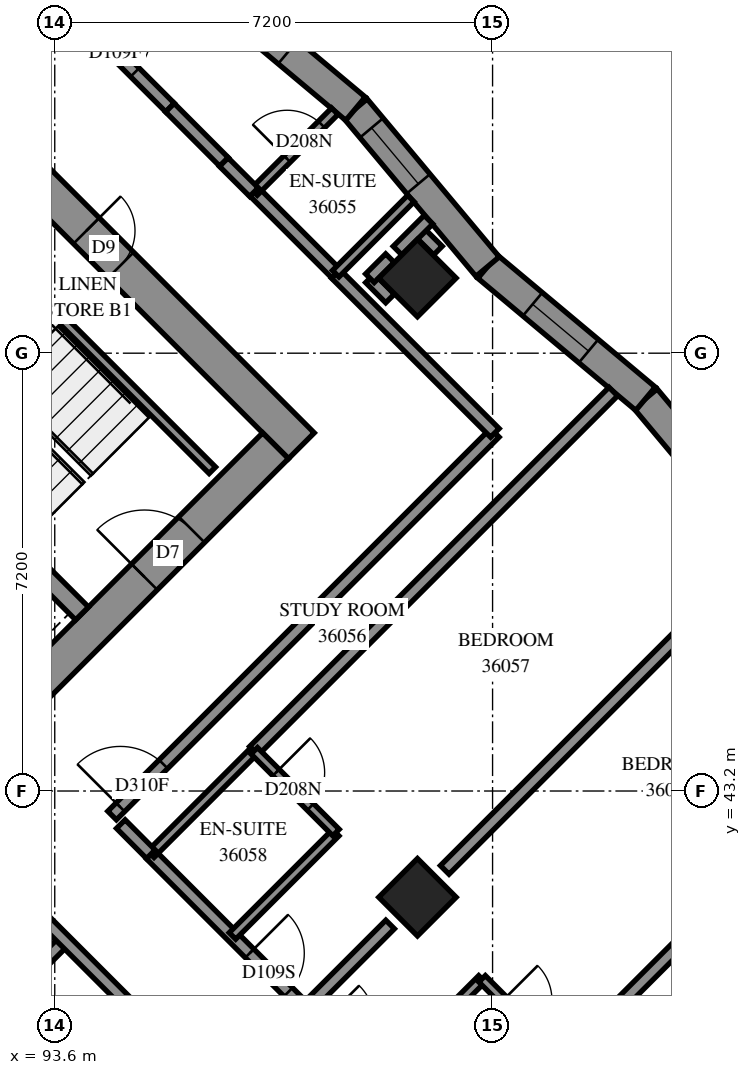
"""IFC4 building model, lengths in metres.
Left out: names, types, materials, properties, quantities, classifications, styles, units other than length and angle.
Written with IfcOpenShell. Run it as: python <this file> out.ifc"""

import sys

from ifc_helpers import new_model, si_unit, direction, frame, frame_2d, origin, origin_2d, place, context, subcontext, project, spatial, polyline, rectangle, outline, extrude, element, fill, save


model = new_model("IFC4")
c1 = context("Model", 3, precision=1e-05, world=origin(), true_north=direction((0.0, 1.0)))
c2 = subcontext(c1, "Body", "Model", "MODEL_VIEW")
j1 = project(units=[si_unit("LENGTHUNIT", "METRE"), si_unit("PLANEANGLEUNIT", "RADIAN")], contexts=[c1])
p1 = place(None, origin())
s1 = spatial("IfcSite", under=j1, at=p1, CompositionType="ELEMENT")
p2 = place(p1, origin())
s2 = spatial("IfcBuilding", under=s1, at=p2, CompositionType="ELEMENT")
p3 = place(p2, frame((0.0, 0.0, 135.4)))
s3 = spatial("IfcBuildingStorey", under=s2, at=p3, CompositionType="ELEMENT", Elevation=135.4)
for number, where, z_axis, x_axis in (
    (1, (99.565, 51.635, 0.0), (0.0, 0.0, 1.0), (0.707, -0.707, 0.0)),
    (2, (99.565, 41.453, 0.0), (0.0, 0.0, 1.0), (0.707, -0.707, 0.0)),
):
    element("IfcColumn", number, at=place(p3, frame(where, z_axis=z_axis, x_axis=x_axis)), inside=s3, PredefinedType="COLUMN", context=c2, shape_type="SweptSolid", body=[
        extrude(rectangle(XDim=0.9, YDim=0.9, at=origin_2d()), origin(), (0.0, 0.0, 1.0), 3.1),
    ])
p4 = place(p3, frame((86.625, 59.908, -0.3), z_axis=(0.0, 0.0, 1.0), x_axis=(0.7071067812, -0.7071067812, 0.0)))
e3 = element("IfcWall", 3, at=p4, inside=s3, PredefinedType="SHEAR", context=c2, shape_type="SweptSolid", body=[
    extrude(rectangle(XDim=15.6, YDim=0.6, at=frame_2d((7.8, 0.0))), origin(), (0.0, 0.0, 1.0), 2.7),
])
p5 = place(p4, frame((10.6, 0.0, 0.3)))
e4 = element("IfcOpeningElement", 4, at=p5, cuts=e3, PredefinedType="OPENING", context=c2, shape_type="SweptSolid", body=[
    extrude(rectangle(XDim=0.8, YDim=2.1, at=frame_2d((0.4, 1.05))), frame((0.0, 0.31, 0.0), z_axis=(0.0, -1.0, 0.0), x_axis=(1.0, 0.0, 0.0)), (0.0, 0.0, 1.0), 0.62),
])
p6 = place(p3, frame((87.049, 38.695, -0.3), z_axis=(0.0, 0.0, 1.0), x_axis=(0.7071067812, 0.7071067812, 0.0)))
e5 = element("IfcWall", 5, at=p6, inside=s3, PredefinedType="SHEAR", context=c2, shape_type="SweptSolid", body=[
    extrude(rectangle(XDim=14.4, YDim=0.6, at=frame_2d((7.2, 0.0))), origin(), (0.0, 0.0, 1.0), 2.7),
])
p7 = place(p6, frame((4.55, 0.0, 0.3)))
e6 = element("IfcOpeningElement", 6, at=p7, cuts=e5, PredefinedType="OPENING", context=c2, shape_type="SweptSolid", body=[
    extrude(rectangle(XDim=1.1, YDim=2.1, at=frame_2d((0.55, 1.05))), frame((0.0, 0.31, 0.0), z_axis=(0.0, -1.0, 0.0), x_axis=(1.0, 0.0, 0.0)), (0.0, 0.0, 1.0), 0.62),
])
p8 = place(p6, frame((11.35, 0.0, 0.3)))
e7 = element("IfcOpeningElement", 7, at=p8, cuts=e5, PredefinedType="OPENING", context=c2, shape_type="SweptSolid", body=[
    extrude(rectangle(XDim=1.1, YDim=2.1, at=frame_2d((0.55, 1.05))), frame((0.0, 0.31, 0.0), z_axis=(0.0, -1.0, 0.0), x_axis=(1.0, 0.0, 0.0)), (0.0, 0.0, 1.0), 0.62),
])
p9 = place(p3, frame((88.958, 51.211, 0.0), z_axis=(0.0, 0.0, 1.0), x_axis=(0.7070998367, -0.7071137256, 0.0)))
e8 = element("IfcWall", 8, at=p9, inside=s3, PredefinedType="SOLIDWALL", context=c2, shape_type="SweptSolid", body=[
    extrude(rectangle(XDim=7.2, YDim=0.3, at=frame_2d((3.6, 0.0))), origin(), (0.0, 0.0, 1.0), 3.1),
])
p10 = place(p3, frame((105.502, 47.038, 0.0), z_axis=(0.0, 0.0, 1.0), x_axis=(-0.6416754301, 0.7669762984, 0.0)))
e9 = element("IfcWall", 9, at=p10, inside=s3, PredefinedType="SOLIDWALL", context=c2, shape_type="SweptSolid", body=[
    extrude(outline(polyline([(0.044, -0.25), (3.43, -0.25), (3.385, 0.25), (-0.044, 0.25), (0.044, -0.25)])), origin(), (0.0, 0.0, 1.0), 3.1),
])
p11 = place(p10, frame((1.093, 0.0, 0.45)))
e10 = element("IfcOpeningElement", 10, at=p11, cuts=e9, PredefinedType="OPENING", context=c2, shape_type="SweptSolid", body=[
    extrude(rectangle(XDim=1.2, YDim=2.5, at=frame_2d((0.6, 1.25))), frame((0.0, 0.26, 0.0), z_axis=(0.0, -1.0, 0.0), x_axis=(1.0, 0.0, 0.0)), (0.0, 0.0, 1.0), 0.52),
])
p12 = place(p3, frame((103.315, 49.651, 0.0), z_axis=(0.0, 0.0, 1.0), x_axis=(-0.7669851583, 0.64166484, 0.0)))
e11 = element("IfcWall", 11, at=p12, inside=s3, PredefinedType="SOLIDWALL", context=c2, shape_type="SweptSolid", body=[
    extrude(outline(polyline([(-0.022, -0.25), (3.364, -0.25), (3.408, 0.25), (0.022, 0.25), (-0.022, -0.25)])), origin(), (0.0, 0.0, 1.0), 3.1),
])
p13 = place(p12, frame((1.221, 0.0, 0.45)))
e12 = element("IfcOpeningElement", 12, at=p13, cuts=e11, PredefinedType="OPENING", context=c2, shape_type="SweptSolid", body=[
    extrude(rectangle(XDim=1.2, YDim=2.5, at=frame_2d((0.6, 1.25))), frame((0.0, 0.26, 0.0), z_axis=(0.0, -1.0, 0.0), x_axis=(1.0, 0.0, 0.0)), (0.0, 0.0, 1.0), 0.52),
])
p14 = place(p3, frame((100.718, 51.824, 0.0), z_axis=(0.0, 0.0, 1.0), x_axis=(-0.6416676788, 0.7669827834, 0.0)))
e13 = element("IfcWall", 13, at=p14, inside=s3, PredefinedType="SOLIDWALL", context=c2, shape_type="SweptSolid", body=[
    extrude(outline(polyline([(0.022, -0.25), (3.408, -0.25), (3.364, 0.25), (-0.022, 0.25), (0.022, -0.25)])), origin(), (0.0, 0.0, 1.0), 3.1),
])
p15 = place(p14, frame((1.774, 0.0, 0.45)))
e14 = element("IfcOpeningElement", 14, at=p15, cuts=e13, PredefinedType="OPENING", context=c2, shape_type="SweptSolid", body=[
    extrude(rectangle(XDim=1.2, YDim=2.5, at=frame_2d((0.6, 1.25))), frame((0.0, 0.26, 0.0), z_axis=(0.0, -1.0, 0.0), x_axis=(1.0, 0.0, 0.0)), (0.0, 0.0, 1.0), 0.52),
])
p16 = place(p3, frame((98.546, 54.421, 0.0), z_axis=(0.0, 0.0, 1.0), x_axis=(-0.7669706225, 0.6416822144, 0.0)))
e15 = element("IfcWall", 15, at=p16, inside=s3, PredefinedType="SOLIDWALL", context=c2, shape_type="SweptSolid", body=[
    extrude(outline(polyline([(-0.022, -0.25), (3.364, -0.25), (3.408, 0.25), (0.022, 0.25), (-0.022, -0.25)])), origin(), (0.0, 0.0, 1.0), 3.1),
])
p17 = place(p16, frame((1.45, 0.0, 0.45)))
e16 = element("IfcOpeningElement", 16, at=p17, cuts=e15, PredefinedType="OPENING", context=c2, shape_type="SweptSolid", body=[
    extrude(rectangle(XDim=1.2, YDim=2.5, at=frame_2d((0.6, 1.25))), frame((0.0, 0.26, 0.0), z_axis=(0.0, -1.0, 0.0), x_axis=(1.0, 0.0, 0.0)), (0.0, 0.0, 1.0), 0.52),
])
p18 = place(p3, frame((91.313, 53.354, 0.0), z_axis=(0.0, 0.0, 1.0), x_axis=(0.7071140275, -0.7070995348, 0.0)))
e17 = element("IfcWall", 17, at=p18, inside=s3, PredefinedType="PARTITIONING", context=c2, shape_type="SweptSolid", body=[
    extrude(rectangle(XDim=6.9, YDim=0.15, at=frame_2d((3.45, 0.0))), origin(), (0.0, 0.0, 1.0), 3.1),
])
p19 = place(p3, frame((86.332, 33.313, 0.0), z_axis=(0.0, 0.0, 1.0), x_axis=(0.7071020252, 0.7071115371, 0.0)))
e18 = element("IfcWall", 18, at=p19, inside=s3, PredefinedType="PARTITIONING", context=c2, shape_type="SweptSolid", body=[
    extrude(rectangle(XDim=10.513, YDim=0.2, at=frame_2d((5.257, 0.0))), origin(), (0.0, 0.0, 1.0), 3.1),
])
p20 = place(p3, frame((88.326, 61.609, 0.0), z_axis=(0.0, 0.0, 1.0), x_axis=(0.7071067812, -0.7071067812, 0.0)))
e19 = element("IfcWall", 19, at=p20, inside=s3, PredefinedType="PARTITIONING", context=c2, shape_type="SweptSolid", body=[
    extrude(rectangle(XDim=10.14, YDim=0.2, at=frame_2d((5.07, 0.0))), origin(), (0.0, 0.0, 1.0), 3.1),
])
p21 = place(p20, frame((8.422, 0.0, 0.0)))
e20 = element("IfcOpeningElement", 20, at=p21, cuts=e19, PredefinedType="OPENING", context=c2, shape_type="SweptSolid", body=[
    extrude(rectangle(XDim=0.9, YDim=2.1, at=frame_2d((0.45, 1.05))), frame((0.0, 0.11, 0.0), z_axis=(0.0, -1.0, 0.0), x_axis=(1.0, 0.0, 0.0)), (0.0, 0.0, 1.0), 0.22),
])
p22 = place(p3, frame((93.127, 41.379, 0.0), z_axis=(0.0, 0.0, 1.0), x_axis=(0.7071067812, -0.7071067812, 0.0)))
e21 = element("IfcWall", 21, at=p22, inside=s3, PredefinedType="PARTITIONING", context=c2, shape_type="SweptSolid", body=[
    extrude(rectangle(XDim=9.39, YDim=0.2, at=frame_2d((4.695, 0.0))), origin(), (0.0, 0.0, 1.0), 3.1),
])
p23 = place(p22, frame((3.2, 0.0, 0.0)))
e22 = element("IfcOpeningElement", 22, at=p23, cuts=e21, PredefinedType="OPENING", context=c2, shape_type="SweptSolid", body=[
    extrude(rectangle(XDim=0.9, YDim=2.1, at=frame_2d((0.45, 1.05))), frame((0.0, 0.11, 0.0), z_axis=(0.0, -1.0, 0.0), x_axis=(1.0, 0.0, 0.0)), (0.0, 0.0, 1.0), 0.22),
])
p24 = place(p3, frame((94.543, 42.797, 0.0), z_axis=(0.0, 0.0, 1.0), x_axis=(0.7071067812, 0.7071067812, 0.0)))
e23 = element("IfcWall", 23, at=p24, inside=s3, PredefinedType="PARTITIONING", context=c2, shape_type="SweptSolid", body=[
    extrude(rectangle(XDim=8.901, YDim=0.2, at=frame_2d((4.45, 0.0))), origin(), (0.0, 0.0, 1.0), 3.1),
])
p25 = place(p24, frame((0.193, 0.0, 0.0)))
e24 = element("IfcOpeningElement", 24, at=p25, cuts=e23, PredefinedType="OPENING", context=c2, shape_type="SweptSolid", body=[
    extrude(rectangle(XDim=1.0, YDim=2.1, at=frame_2d((0.5, 1.05))), frame((0.0, 0.11, 0.0), z_axis=(0.0, -1.0, 0.0), x_axis=(1.0, 0.0, 0.0)), (0.0, 0.0, 1.0), 0.22),
])
p26 = place(p3, frame((95.177, 42.157, 0.0), z_axis=(0.0, 0.0, 1.0), x_axis=(0.7071067812, -0.7071067812, 0.0)))
e25 = element("IfcWall", 25, at=p26, inside=s3, PredefinedType="PARTITIONING", context=c2, shape_type="SweptSolid", body=[
    extrude(rectangle(XDim=8.491, YDim=0.2, at=frame_2d((4.245, 0.0))), origin(), (0.0, 0.0, 1.0), 3.1),
])
p27 = place(p26, frame((2.3, 0.0, 0.0)))
e26 = element("IfcOpeningElement", 26, at=p27, cuts=e25, PredefinedType="OPENING", context=c2, shape_type="SweptSolid", body=[
    extrude(rectangle(XDim=0.9, YDim=2.1, at=frame_2d((0.45, 1.05))), frame((0.0, 0.11, 0.0), z_axis=(0.0, -1.0, 0.0), x_axis=(1.0, 0.0, 0.0)), (0.0, 0.0, 1.0), 0.22),
])
p28 = place(p26, frame((3.95, 0.0, 0.0)))
e27 = element("IfcOpeningElement", 27, at=p28, cuts=e25, PredefinedType="OPENING", context=c2, shape_type="SweptSolid", body=[
    extrude(rectangle(XDim=0.9, YDim=2.1, at=frame_2d((0.45, 1.05))), frame((0.0, 0.11, 0.0), z_axis=(0.0, -1.0, 0.0), x_axis=(1.0, 0.0, 0.0)), (0.0, 0.0, 1.0), 0.22),
])
p29 = place(p3, frame((96.875, 43.861, 0.0), z_axis=(0.0, 0.0, 1.0), x_axis=(0.7072324205, 0.7069811196, 0.0)))
e28 = element("IfcWall", 28, at=p29, inside=s3, PredefinedType="PARTITIONING", context=c2, shape_type="SweptSolid", body=[
    extrude(rectangle(XDim=8.357, YDim=0.2, at=frame_2d((4.178, 0.0))), origin(), (0.0, 0.0, 1.0), 3.1),
])
p30 = place(p3, frame((100.013, 41.903, 0.0), z_axis=(0.0, 0.0, 1.0), x_axis=(0.7071067812, 0.7071067812, 0.0)))
e29 = element("IfcWall", 29, at=p30, inside=s3, PredefinedType="PARTITIONING", context=c2, shape_type="SweptSolid", body=[
    extrude(rectangle(XDim=5.928, YDim=0.2, at=frame_2d((2.964, 0.0))), origin(), (0.0, 0.0, 1.0), 3.1),
])
p31 = place(p3, frame((98.221, 51.705, 0.0), z_axis=(0.0, 0.0, 1.0), x_axis=(0.7073229887, -0.7068905075, 0.0)))
e30 = element("IfcWall", 30, at=p31, inside=s3, PredefinedType="PARTITIONING", context=c2, shape_type="SweptSolid", body=[
    extrude(rectangle(XDim=3.7, YDim=0.2, at=frame_2d((1.85, 0.0))), origin(), (0.0, 0.0, 1.0), 3.1),
])
p32 = place(p3, frame((101.968, 38.766, 0.0), z_axis=(0.0, 0.0, 1.0), x_axis=(0.7071067812, 0.7071067812, 0.0)))
e31 = element("IfcWall", 31, at=p32, inside=s3, PredefinedType="PARTITIONING", context=c2, shape_type="SweptSolid", body=[
    extrude(rectangle(XDim=3.3, YDim=0.2, at=frame_2d((1.65, 0.0))), origin(), (0.0, 0.0, 1.0), 3.1),
])
for number, where, z_axis, x_axis in (
    (32, (96.523, 40.817, 0.0), (0.0, 0.0, 1.0), (0.707, 0.707, 0.0)),
    (33, (98.927, 38.413, 0.0), (0.0, 0.0, 1.0), (0.707, 0.707, 0.0)),
    (34, (95.179, 42.161, 0.0), (0.0, 0.0, 1.0), (0.707, 0.707, 0.0)),
):
    element("IfcWall", number, at=place(p3, frame(where, z_axis=z_axis, x_axis=x_axis)), inside=s3, PredefinedType="PARTITIONING", context=c2, shape_type="SweptSolid", body=[
        extrude(rectangle(XDim=2.401, YDim=0.15, at=frame_2d((1.201, 0.0))), origin(), (0.0, 0.0, 1.0), 3.1),
    ])
p33 = place(p3, frame((97.725, 39.615, 0.0), z_axis=(0.0, 0.0, 1.0), x_axis=(0.7071067812, 0.7071067812, 0.0)))
e35 = element("IfcWall", 35, at=p33, inside=s3, PredefinedType="PARTITIONING", context=c2, shape_type="SweptSolid", body=[
    extrude(rectangle(XDim=1.966, YDim=0.2, at=frame_2d((0.983, 0.0))), origin(), (0.0, 0.0, 1.0), 3.1),
])
p34 = place(p3, frame((96.882, 53.053, 0.0), z_axis=(0.0, 0.0, 1.0), x_axis=(0.7071067812, -0.7071067812, 0.0)))
e36 = element("IfcWall", 36, at=p34, inside=s3, PredefinedType="PARTITIONING", context=c2, shape_type="SweptSolid", body=[
    extrude(rectangle(XDim=1.901, YDim=0.2, at=frame_2d((0.95, 0.0))), origin(), (0.0, 0.0, 1.0), 3.1),
])
p35 = place(p3, frame((96.881, 43.861, 0.0), z_axis=(0.0, 0.0, 1.0), x_axis=(0.7071067812, -0.7071067812, 0.0)))
e37 = element("IfcWall", 37, at=p35, inside=s3, PredefinedType="PARTITIONING", context=c2, shape_type="SweptSolid", body=[
    extrude(rectangle(XDim=1.901, YDim=0.15, at=frame_2d((0.95, 0.0))), origin(), (0.0, 0.0, 1.0), 3.1),
])
p36 = place(p35, frame((0.505, 0.0, 0.0)))
e38 = element("IfcOpeningElement", 38, at=p36, cuts=e37, PredefinedType="OPENING", context=c2, shape_type="SweptSolid", body=[
    extrude(rectangle(XDim=0.8, YDim=2.1, at=frame_2d((0.4, 1.05))), frame((0.0, 0.085, 0.0), z_axis=(0.0, -1.0, 0.0), x_axis=(1.0, 0.0, 0.0)), (0.0, 0.0, 1.0), 0.17),
])
p37 = place(p3, frame((100.628, 40.112, 0.0), z_axis=(0.0, 0.0, 1.0), x_axis=(0.7065800724, -0.7076330979, 0.0)))
e39 = element("IfcWall", 39, at=p37, inside=s3, PredefinedType="PARTITIONING", context=c2, shape_type="SweptSolid", body=[
    extrude(rectangle(XDim=1.899, YDim=0.15, at=frame_2d((0.95, 0.0))), origin(), (0.0, 0.0, 1.0), 3.1),
])
p38 = place(p37, frame((0.493, 0.0, 0.0)))
e40 = element("IfcOpeningElement", 40, at=p38, cuts=e39, PredefinedType="OPENING", context=c2, shape_type="SweptSolid", body=[
    extrude(rectangle(XDim=0.8, YDim=2.1, at=frame_2d((0.4, 1.05))), frame((0.0, 0.085, 0.0), z_axis=(0.0, -1.0, 0.0), x_axis=(1.0, 0.0, 0.0)), (0.0, 0.0, 1.0), 0.17),
])
p39 = place(p3, frame((96.877, 53.051, 0.0), z_axis=(0.0, 0.0, 1.0), x_axis=(0.7071333947, 0.7070801667, 0.0)))
e41 = element("IfcWall", 41, at=p39, inside=s3, PredefinedType="PARTITIONING", context=c2, shape_type="SweptSolid", body=[
    extrude(rectangle(XDim=1.879, YDim=0.15, at=frame_2d((0.939, 0.0))), origin(), (0.0, 0.0, 1.0), 3.1),
])
p40 = place(p39, frame((0.77, 0.0, 0.0)))
e42 = element("IfcOpeningElement", 42, at=p40, cuts=e41, PredefinedType="OPENING", context=c2, shape_type="SweptSolid", body=[
    extrude(rectangle(XDim=0.8, YDim=2.1, at=frame_2d((0.4, 1.05))), frame((0.0, 0.085, 0.0), z_axis=(0.0, -1.0, 0.0), x_axis=(1.0, 0.0, 0.0)), (0.0, 0.0, 1.0), 0.17),
])
p41 = place(p3, frame((98.221, 51.707, 0.0), z_axis=(0.0, 0.0, 1.0), x_axis=(0.7071353957, 0.7070781655, 0.0)))
e43 = element("IfcWall", 43, at=p41, inside=s3, PredefinedType="PARTITIONING", context=c2, shape_type="SweptSolid", body=[
    extrude(rectangle(XDim=1.747, YDim=0.15, at=frame_2d((0.874, 0.0))), origin(), (0.0, 0.0, 1.0), 3.1),
])
p42 = place(p3, frame((95.494, 54.438, 0.0), z_axis=(0.0, 0.0, 1.0), x_axis=(0.706312726, -0.7078999456, 0.0)))
e44 = element("IfcWall", 44, at=p42, inside=s3, PredefinedType="PARTITIONING", context=c2, shape_type="SweptSolid", body=[
    extrude(rectangle(XDim=1.26, YDim=0.2, at=frame_2d((0.63, 0.0))), origin(), (0.0, 0.0, 1.0), 3.1),
])
for number, where, z_axis, x_axis in (
    (45, (96.38, 53.542, 0.0), (0.0, 0.0, 1.0), (0.709, -0.706, 0.0)),
    (46, (94.686, 42.656, 0.0), (0.0, 0.0, 1.0), (0.706, -0.709, 0.0)),
):
    element("IfcWall", number, at=place(p3, frame(where, z_axis=z_axis, x_axis=x_axis)), inside=s3, PredefinedType="PARTITIONING", context=c2, shape_type="SweptSolid", body=[
        extrude(rectangle(XDim=0.7, YDim=0.2, at=frame_2d((0.35, 0.0))), origin(), (0.0, 0.0, 1.0), 3.1),
    ])
for number, where, z_axis, x_axis in (
    (47, (99.57, 52.418, 0.0), (0.0, 0.0, 1.0), (0.709, -0.705, 0.0)),
    (48, (98.784, 51.632, 0.0), (0.0, 0.0, 1.0), (0.705, -0.709, 0.0)),
):
    element("IfcWall", number, at=place(p3, frame(where, z_axis=z_axis, x_axis=x_axis)), inside=s3, PredefinedType="PARTITIONING", context=c2, shape_type="SweptSolid", body=[
        extrude(rectangle(XDim=0.468, YDim=0.2, at=frame_2d((0.234, 0.0))), origin(), (0.0, 0.0, 1.0), 3.1),
    ])
p43 = place(p3, frame((98.783, 51.633, 0.0), z_axis=(0.0, 0.0, 1.0), x_axis=(0.7071067812, 0.7071067812, 0.0)))
e49 = element("IfcWall", 49, at=p43, inside=s3, PredefinedType="PARTITIONING", context=c2, shape_type="SweptSolid", body=[
    extrude(rectangle(XDim=0.467, YDim=0.2, at=frame_2d((0.233, 0.0))), origin(), (0.0, 0.0, 1.0), 3.1),
])
p44 = place(p3, frame((99.237, 52.087, 0.0), z_axis=(0.0, 0.0, 1.0), x_axis=(0.7071067812, 0.7071067812, 0.0)))
e50 = element("IfcWall", 50, at=p44, inside=s3, PredefinedType="PARTITIONING", context=c2, shape_type="SweptSolid", body=[
    extrude(rectangle(XDim=0.72, YDim=0.2, at=frame_2d((0.36, 0.0))), origin(), (0.0, 0.0, 1.0), 3.1),
])
p45 = place(p13, origin())
e51 = element("IfcWindow", 51, at=p45, inside=s3, PartitioningType="SINGLE_PANEL", PredefinedType="WINDOW", context=c2, shape_type="SweptSolid", body=[
    extrude(rectangle(XDim=1.2, YDim=2.5, at=frame_2d((0.6, 1.25))), frame((0.0, 0.18, 0.0), z_axis=(0.0, -1.0, 0.0), x_axis=(1.0, 0.0, 0.0)), (0.0, 0.0, 1.0), 0.06),
])
fill(e12, e51)
p46 = place(p15, origin())
e52 = element("IfcWindow", 52, at=p46, inside=s3, PartitioningType="SINGLE_PANEL", PredefinedType="WINDOW", context=c2, shape_type="SweptSolid", body=[
    extrude(rectangle(XDim=1.2, YDim=2.5, at=frame_2d((0.6, 1.25))), frame((0.0, 0.18, 0.0), z_axis=(0.0, -1.0, 0.0), x_axis=(1.0, 0.0, 0.0)), (0.0, 0.0, 1.0), 0.06),
])
fill(e14, e52)
p47 = place(p17, origin())
e53 = element("IfcWindow", 53, at=p47, inside=s3, PartitioningType="SINGLE_PANEL", PredefinedType="WINDOW", context=c2, shape_type="SweptSolid", body=[
    extrude(rectangle(XDim=1.2, YDim=2.5, at=frame_2d((0.6, 1.25))), frame((0.0, 0.18, 0.0), z_axis=(0.0, -1.0, 0.0), x_axis=(1.0, 0.0, 0.0)), (0.0, 0.0, 1.0), 0.06),
])
fill(e16, e53)
p48 = place(p5, origin())
e54 = element("IfcDoor", 54, at=p48, inside=s3, OperationType="SINGLE_SWING_RIGHT", PredefinedType="DOOR", context=c2, shape_type="SweptSolid", body=[
    extrude(rectangle(XDim=0.8, YDim=2.1, at=frame_2d((0.4, 1.05))), frame((0.0, 0.025, 0.0), z_axis=(0.0, -1.0, 0.0), x_axis=(1.0, 0.0, 0.0)), (0.0, 0.0, 1.0), 0.05),
])
fill(e4, e54)
p49 = place(p8, origin())
e55 = element("IfcDoor", 55, at=p49, inside=s3, OperationType="SINGLE_SWING_RIGHT", PredefinedType="DOOR", context=c2, shape_type="SweptSolid", body=[
    extrude(rectangle(XDim=1.1, YDim=2.1, at=frame_2d((0.55, 1.05))), frame((0.0, 0.025, 0.0), z_axis=(0.0, -1.0, 0.0), x_axis=(1.0, 0.0, 0.0)), (0.0, 0.0, 1.0), 0.05),
])
fill(e7, e55)
p50 = place(p21, origin())
e56 = element("IfcDoor", 56, at=p50, inside=s3, OperationType="SINGLE_SWING_LEFT", PredefinedType="DOOR", context=c2, shape_type="SweptSolid", body=[
    extrude(rectangle(XDim=0.9, YDim=2.1, at=frame_2d((0.45, 1.05))), frame((0.0, 0.025, 0.0), z_axis=(0.0, -1.0, 0.0), x_axis=(1.0, 0.0, 0.0)), (0.0, 0.0, 1.0), 0.05),
])
fill(e20, e56)
p51 = place(p40, origin())
e57 = element("IfcDoor", 57, at=p51, inside=s3, OperationType="SINGLE_SWING_RIGHT", PredefinedType="DOOR", context=c2, shape_type="SweptSolid", body=[
    extrude(rectangle(XDim=0.8, YDim=2.1, at=frame_2d((0.4, 1.05))), frame((0.0, 0.025, 0.0), z_axis=(0.0, -1.0, 0.0), x_axis=(1.0, 0.0, 0.0)), (0.0, 0.0, 1.0), 0.05),
])
fill(e42, e57)
p52 = place(p25, origin())
e58 = element("IfcDoor", 58, at=p52, inside=s3, OperationType="SINGLE_SWING_LEFT", PredefinedType="DOOR", context=c2, shape_type="SweptSolid", body=[
    extrude(rectangle(XDim=1.0, YDim=2.1, at=frame_2d((0.5, 1.05))), frame((0.0, 0.025, 0.0), z_axis=(0.0, -1.0, 0.0), x_axis=(1.0, 0.0, 0.0)), (0.0, 0.0, 1.0), 0.05),
])
fill(e24, e58)
p53 = place(p27, origin())
e59 = element("IfcDoor", 59, at=p53, inside=s3, OperationType="SINGLE_SWING_RIGHT", PredefinedType="DOOR", context=c2, shape_type="SweptSolid", body=[
    extrude(rectangle(XDim=0.9, YDim=2.1, at=frame_2d((0.45, 1.05))), frame((0.0, 0.025, 0.0), z_axis=(0.0, -1.0, 0.0), x_axis=(1.0, 0.0, 0.0)), (0.0, 0.0, 1.0), 0.05),
])
fill(e26, e59)
p54 = place(p36, origin())
e60 = element("IfcDoor", 60, at=p54, inside=s3, OperationType="SINGLE_SWING_RIGHT", PredefinedType="DOOR", context=c2, shape_type="SweptSolid", body=[
    extrude(rectangle(XDim=0.8, YDim=2.1, at=frame_2d((0.4, 1.05))), frame((0.0, 0.025, 0.0), z_axis=(0.0, -1.0, 0.0), x_axis=(1.0, 0.0, 0.0)), (0.0, 0.0, 1.0), 0.05),
])
fill(e38, e60)
save(model, sys.argv[1])
